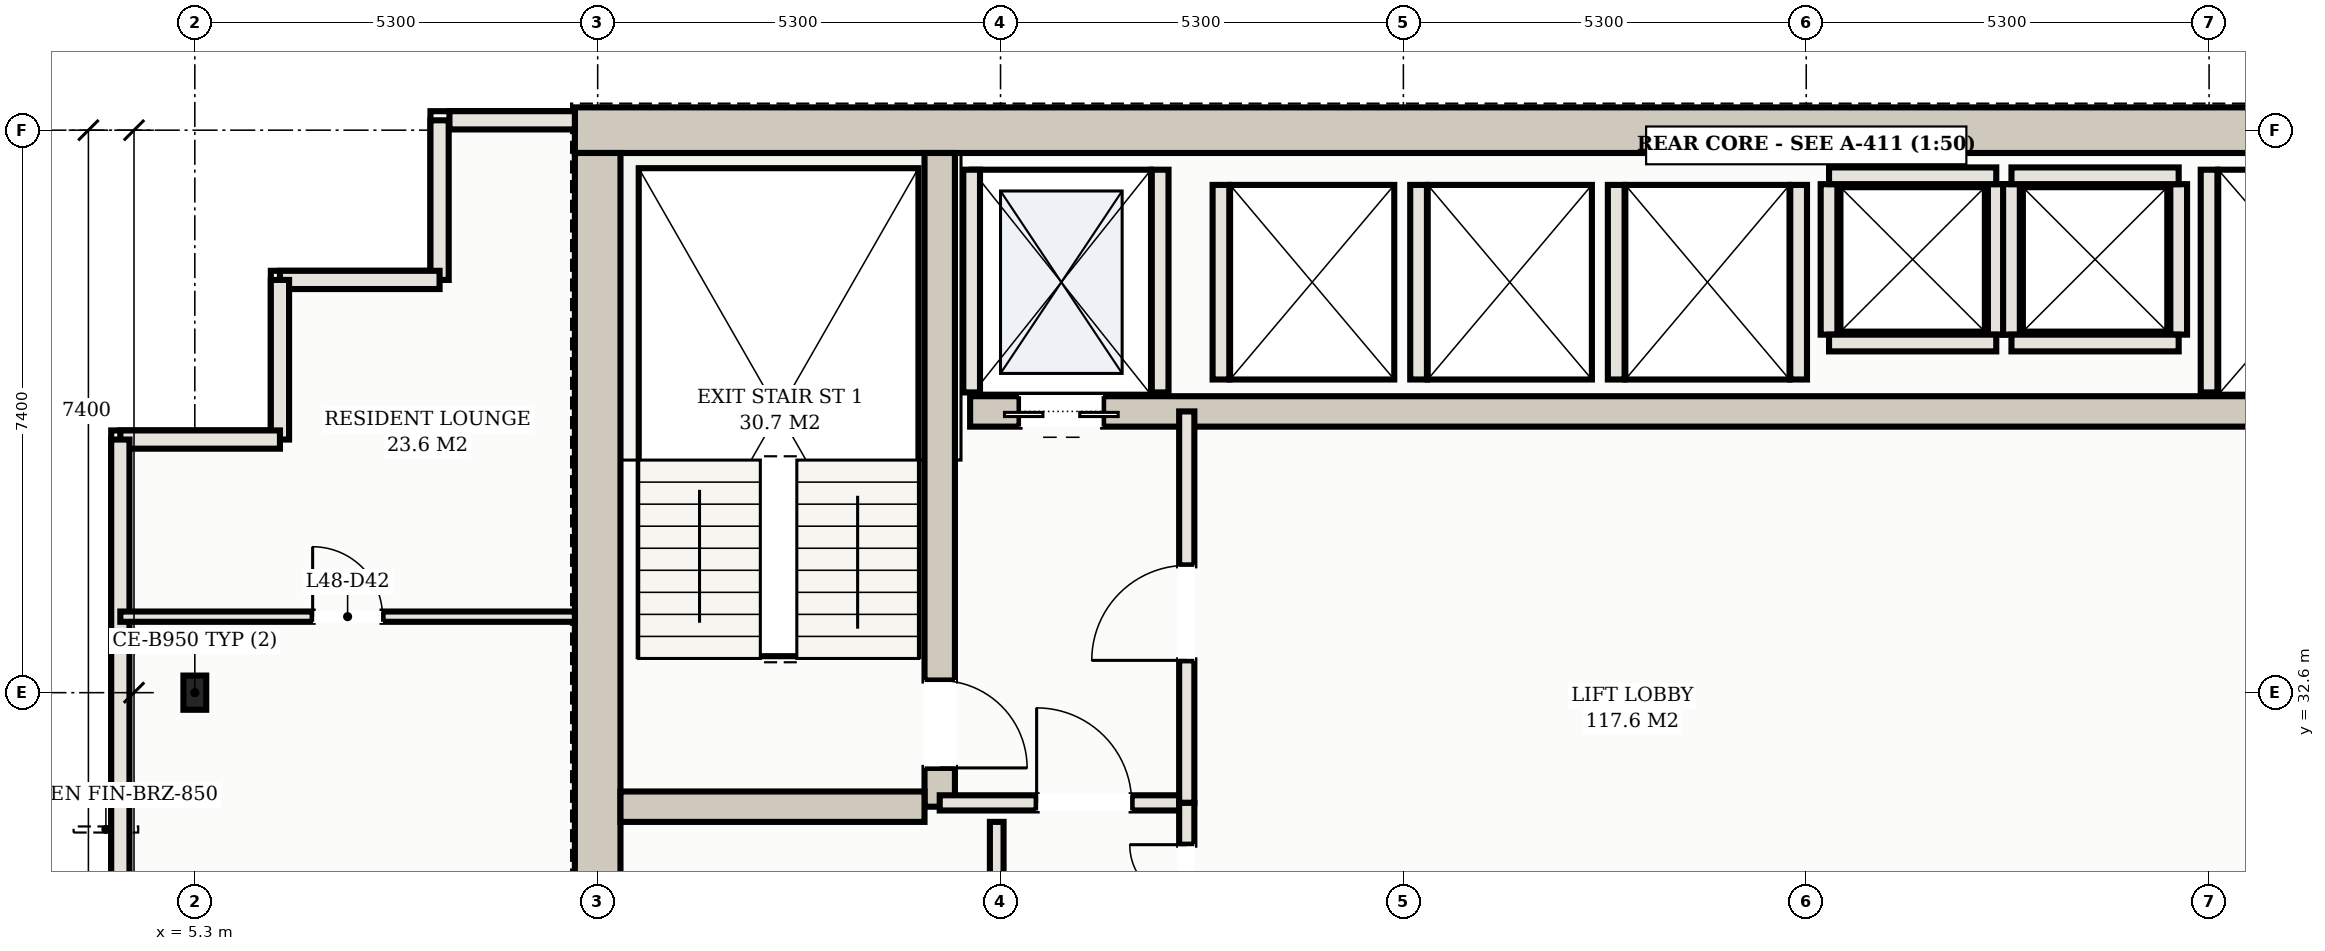
"""IFC4 building model, lengths in metres.
Left out: names, types, materials, properties, quantities, classifications, styles, units other than length and angle.
Written with IfcOpenShell. Run it as: python <this file> out.ifc"""

import sys

from ifc_helpers import new_model, si_unit, direction, frame, frame_2d, origin, origin_2d, place, context, subcontext, project, spatial, rectangle, hollow_rectangle, extrude, element, fill, save


model = new_model("IFC4")
c1 = context("Model", 3, precision=1e-05, world=origin(), true_north=direction((0.0, 1.0)))
c2 = subcontext(c1, "Body", "Model", "MODEL_VIEW")
j1 = project(units=[si_unit("LENGTHUNIT", "METRE"), si_unit("PLANEANGLEUNIT", "RADIAN")], contexts=[c1])
p1 = place(None, origin())
s1 = spatial("IfcSite", under=j1, at=p1, CompositionType="ELEMENT")
p2 = place(p1, origin())
s2 = spatial("IfcBuilding", under=s1, at=p2, CompositionType="ELEMENT")
p3 = place(p2, frame((0.0, 0.0, 175.5)))
s3 = spatial("IfcBuildingStorey", under=s2, at=p3, CompositionType="ELEMENT", Elevation=175.5)
p4 = place(p3, frame((10.3, 40.0, 0.0), z_axis=(0.0, 0.0, 1.0), x_axis=(1.0, 0.0, 0.0)))
e1 = element("IfcWall", 1, at=p4, inside=s3, PredefinedType="SHEAR", context=c2, shape_type="SweptSolid", body=[
    extrude(rectangle(XDim=32.4, YDim=0.6, at=frame_2d((16.2, 0.0))), origin(), (0.0, 0.0, 1.0), 3.1),
])
p5 = place(p3, frame((10.6, 25.5, 0.0), z_axis=(0.0, 0.0, 1.0), x_axis=(0.0, 1.0, 0.0)))
e2 = element("IfcWall", 2, at=p5, inside=s3, PredefinedType="SHEAR", context=c2, shape_type="SweptSolid", body=[
    extrude(rectangle(XDim=14.2, YDim=0.6, at=frame_2d((7.1, 0.0))), origin(), (0.0, 0.0, 1.0), 3.1),
])
p6 = place(p3, frame((15.1, 31.1, 0.0), z_axis=(0.0, 0.0, 1.0), x_axis=(0.0, 1.0, 0.0)))
e3 = element("IfcWall", 3, at=p6, inside=s3, PredefinedType="SHEAR", context=c2, shape_type="SweptSolid", body=[
    extrude(rectangle(XDim=8.6, YDim=0.4, at=frame_2d((4.3, 0.0))), origin(), (0.0, 0.0, 1.0), 3.1),
])
p7 = place(p6, frame((0.51, 0.0, 0.0)))
e4 = element("IfcOpeningElement", 4, at=p7, cuts=e3, PredefinedType="OPENING", context=c2, shape_type="SweptSolid", body=[
    extrude(rectangle(XDim=1.15, YDim=2.2, at=frame_2d((0.575, 1.1))), frame((0.0, 0.21, 0.0), z_axis=(0.0, -1.0, 0.0), x_axis=(1.0, 0.0, 0.0)), (0.0, 0.0, 1.0), 0.42),
])
p8 = place(p3, frame((10.9, 31.1, 0.0), z_axis=(0.0, 0.0, 1.0), x_axis=(1.0, 0.0, 0.0)))
e5 = element("IfcWall", 5, at=p8, inside=s3, PredefinedType="SHEAR", context=c2, shape_type="SweptSolid", body=[
    extrude(rectangle(XDim=4.0, YDim=0.4, at=frame_2d((2.0, 0.0))), origin(), (0.0, 0.0, 1.0), 3.1),
])
p9 = place(p3, frame((15.5, 36.3, 0.0), z_axis=(0.0, 0.0, 1.0), x_axis=(1.0, 0.0, 0.0)))
e6 = element("IfcWall", 6, at=p9, inside=s3, PredefinedType="SHEAR", context=c2, shape_type="SweptSolid", body=[
    extrude(rectangle(XDim=22.0, YDim=0.4, at=frame_2d((11.0, 0.0))), origin(), (0.0, 0.0, 1.0), 3.1),
])
p10 = place(p9, frame((0.65, 0.0, 0.0)))
e7 = element("IfcOpeningElement", 7, at=p10, cuts=e6, PredefinedType="OPENING", context=c2, shape_type="SweptSolid", body=[
    extrude(rectangle(XDim=1.1, YDim=2.15, at=frame_2d((0.55, 1.075))), frame((0.0, 0.21, 0.0), z_axis=(0.0, -1.0, 0.0), x_axis=(1.0, 0.0, 0.0)), (0.0, 0.0, 1.0), 0.42),
])
p11 = place(p9, frame((20.25, 0.0, 0.0)))
e8 = element("IfcOpeningElement", 8, at=p11, cuts=e6, PredefinedType="OPENING", context=c2, shape_type="SweptSolid", body=[
    extrude(rectangle(XDim=1.1, YDim=2.15, at=frame_2d((0.55, 1.075))), frame((0.0, 0.21, 0.0), z_axis=(0.0, -1.0, 0.0), x_axis=(1.0, 0.0, 0.0)), (0.0, 0.0, 1.0), 0.42),
])
p12 = place(p9, frame((17.05, 0.0, 0.0)))
e9 = element("IfcOpeningElement", 9, at=p12, cuts=e6, PredefinedType="OPENING", context=c2, shape_type="SweptSolid", body=[
    extrude(rectangle(XDim=1.3, YDim=2.2, at=frame_2d((0.65, 1.1))), frame((0.0, 0.21, 0.0), z_axis=(0.0, -1.0, 0.0), x_axis=(1.0, 0.0, 0.0)), (0.0, 0.0, 1.0), 0.42),
])
p13 = place(p3, frame((5.3, 32.6, 0.0), z_axis=(0.0, 0.0, 1.0), x_axis=(1.0, 0.0, 0.0)))
e10 = element("IfcColumn", 10, at=p13, inside=s3, PredefinedType="COLUMN", context=c2, shape_type="SweptSolid", body=[
    extrude(hollow_rectangle(XDim=0.3, YDim=0.45, WallThickness=0.016, at=origin_2d()), origin(), (0.0, 0.0, 1.0), 3.3),
])
for number, where, z_axis, x_axis in (
    (11, (15.52, 36.55, 0.0), (0.0, 0.0, 1.0), (0.0, 1.0, 0.0)),
    (12, (18.0, 36.55, 0.0), (0.0, 0.0, 1.0), (0.0, 1.0, 0.0)),
    (13, (31.8, 36.55, 0.0), (0.0, 0.0, 1.0), (0.0, 1.0, 0.0)),
):
    element("IfcWall", number, at=place(p3, frame(where, z_axis=z_axis, x_axis=x_axis)), inside=s3, PredefinedType="SOLIDWALL", context=c2, shape_type="SweptSolid", body=[
        extrude(rectangle(XDim=2.93, YDim=0.22, at=frame_2d((1.465, 0.0))), origin(), (0.0, 0.0, 1.0), 3.1),
    ])
for number, where, z_axis, x_axis in (
    (14, (18.8, 36.72, 0.0), (0.0, 0.0, 1.0), (0.0, 1.0, 0.0)),
    (15, (21.4, 36.72, 0.0), (0.0, 0.0, 1.0), (0.0, 1.0, 0.0)),
    (16, (24.0, 36.72, 0.0), (0.0, 0.0, 1.0), (0.0, 1.0, 0.0)),
    (17, (26.4, 36.72, 0.0), (0.0, 0.0, 1.0), (0.0, 1.0, 0.0)),
):
    element("IfcWall", number, at=place(p3, frame(where, z_axis=z_axis, x_axis=x_axis)), inside=s3, PredefinedType="SOLIDWALL", context=c2, shape_type="SweptSolid", body=[
        extrude(rectangle(XDim=2.56, YDim=0.22, at=frame_2d((1.28, 0.0))), origin(), (0.0, 0.0, 1.0), 3.1),
    ])
for number, where, z_axis, x_axis in (
    (18, (26.8, 37.31, 0.0), (0.0, 0.0, 1.0), (0.0, 1.0, 0.0)),
    (19, (29.0, 37.31, 0.0), (0.0, 0.0, 1.0), (0.0, 1.0, 0.0)),
):
    element("IfcWall", number, at=place(p3, frame(where, z_axis=z_axis, x_axis=x_axis)), inside=s3, PredefinedType="SOLIDWALL", context=c2, shape_type="SweptSolid", body=[
        extrude(rectangle(XDim=1.98, YDim=0.22, at=frame_2d((0.99, 0.0))), origin(), (0.0, 0.0, 1.0), 3.1),
    ])
for number, where, z_axis, x_axis in (
    (20, (26.8, 39.4, 0.0), (0.0, 0.0, 1.0), (1.0, 0.0, 0.0)),
    (21, (26.8, 37.2, 0.0), (0.0, 0.0, 1.0), (1.0, 0.0, 0.0)),
):
    element("IfcWall", number, at=place(p3, frame(where, z_axis=z_axis, x_axis=x_axis)), inside=s3, PredefinedType="SOLIDWALL", context=c2, shape_type="SweptSolid", body=[
        extrude(rectangle(XDim=2.2, YDim=0.22, at=frame_2d((1.1, 0.0))), origin(), (0.0, 0.0, 1.0), 3.1),
    ])
for number, where, z_axis, x_axis in (
    (22, (29.2, 37.31, 0.0), (0.0, 0.0, 1.0), (0.0, 1.0, 0.0)),
    (23, (31.4, 37.31, 0.0), (0.0, 0.0, 1.0), (0.0, 1.0, 0.0)),
):
    element("IfcWall", number, at=place(p3, frame(where, z_axis=z_axis, x_axis=x_axis)), inside=s3, PredefinedType="SOLIDWALL", context=c2, shape_type="SweptSolid", body=[
        extrude(rectangle(XDim=1.98, YDim=0.22, at=frame_2d((0.99, 0.0))), origin(), (0.0, 0.0, 1.0), 3.1),
    ])
for number, where, z_axis, x_axis in (
    (24, (29.2, 39.4, 0.0), (0.0, 0.0, 1.0), (1.0, 0.0, 0.0)),
    (25, (29.2, 37.2, 0.0), (0.0, 0.0, 1.0), (1.0, 0.0, 0.0)),
):
    element("IfcWall", number, at=place(p3, frame(where, z_axis=z_axis, x_axis=x_axis)), inside=s3, PredefinedType="SOLIDWALL", context=c2, shape_type="SweptSolid", body=[
        extrude(rectangle(XDim=2.2, YDim=0.22, at=frame_2d((1.1, 0.0))), origin(), (0.0, 0.0, 1.0), 3.1),
    ])
p14 = place(p3, frame((10.3, 40.13, 0.0), z_axis=(0.0, 0.0, 1.0), x_axis=(-1.0, 0.0, 0.0)))
e26 = element("IfcWall", 26, at=p14, inside=s3, PredefinedType="SOLIDWALL", context=c2, shape_type="SweptSolid", body=[
    extrude(rectangle(XDim=1.65, YDim=0.24, at=frame_2d((0.825, 0.0))), origin(), (0.0, 0.0, 1.0), 3.1),
])
p15 = place(p3, frame((8.52, 40.13, 0.0), z_axis=(0.0, 0.0, 1.0), x_axis=(0.0, -1.0, 0.0)))
e27 = element("IfcWall", 27, at=p15, inside=s3, PredefinedType="SOLIDWALL", context=c2, shape_type="SweptSolid", body=[
    extrude(rectangle(XDim=2.1, YDim=0.24, at=frame_2d((1.05, 0.0))), origin(), (0.0, 0.0, 1.0), 3.1),
])
for number, where, z_axis, x_axis in (
    (28, (8.52, 38.03, 0.0), (0.0, 0.0, 1.0), (-1.0, 0.0, 0.0)),
    (29, (6.42, 38.03, 0.0), (0.0, 0.0, 1.0), (0.0, -1.0, 0.0)),
):
    element("IfcWall", number, at=place(p3, frame(where, z_axis=z_axis, x_axis=x_axis)), inside=s3, PredefinedType="SOLIDWALL", context=c2, shape_type="SweptSolid", body=[
        extrude(rectangle(XDim=2.1, YDim=0.24, at=frame_2d((1.05, 0.0))), origin(), (0.0, 0.0, 1.0), 3.1),
    ])
p16 = place(p3, frame((6.42, 35.93, 0.0), z_axis=(0.0, 0.0, 1.0), x_axis=(-1.0, 0.0, 0.0)))
e30 = element("IfcWall", 30, at=p16, inside=s3, PredefinedType="SOLIDWALL", context=c2, shape_type="SweptSolid", body=[
    extrude(rectangle(XDim=2.1, YDim=0.24, at=frame_2d((1.05, 0.0))), origin(), (0.0, 0.0, 1.0), 3.1),
])
p17 = place(p3, frame((4.32, 35.93, 0.0), z_axis=(0.0, 0.0, 1.0), x_axis=(0.0, -1.0, 0.0)))
e31 = element("IfcWall", 31, at=p17, inside=s3, PredefinedType="SOLIDWALL", context=c2, shape_type="SweptSolid", body=[
    extrude(rectangle(XDim=27.41, YDim=0.24, at=frame_2d((13.705, 0.0))), origin(), (0.0, 0.0, 1.0), 3.1),
])
p18 = place(p17, frame((17.13, 0.0, 0.0)))
e32 = element("IfcOpeningElement", 32, at=p18, cuts=e31, PredefinedType="OPENING", context=c2, shape_type="SweptSolid", body=[
    extrude(rectangle(XDim=1.8, YDim=2.2, at=frame_2d((0.9, 1.1))), frame((0.0, 0.13, 0.0), z_axis=(0.0, -1.0, 0.0), x_axis=(1.0, 0.0, 0.0)), (0.0, 0.0, 1.0), 0.26),
])
p19 = place(p3, frame((15.1, 31.15, 0.0), z_axis=(0.0, 0.0, 1.0), x_axis=(1.0, 0.0, 0.0)))
e33 = element("IfcWall", 33, at=p19, inside=s3, PredefinedType="PARTITIONING", context=c2, shape_type="SweptSolid", body=[
    extrude(rectangle(XDim=3.25, YDim=0.2, at=frame_2d((1.625, 0.0))), origin(), (0.0, 0.0, 1.0), 2.38),
])
p20 = place(p19, frame((1.275, 0.0, 0.0)))
e34 = element("IfcOpeningElement", 34, at=p20, cuts=e33, PredefinedType="OPENING", context=c2, shape_type="SweptSolid", body=[
    extrude(rectangle(XDim=1.25, YDim=2.2, at=frame_2d((0.625, 1.1))), frame((0.0, 0.11, 0.0), z_axis=(0.0, -1.0, 0.0), x_axis=(1.0, 0.0, 0.0)), (0.0, 0.0, 1.0), 0.22),
])
p21 = place(p3, frame((18.35, 31.15, 0.0), z_axis=(0.0, 0.0, 1.0), x_axis=(0.0, 1.0, 0.0)))
e35 = element("IfcWall", 35, at=p21, inside=s3, PredefinedType="PARTITIONING", context=c2, shape_type="SweptSolid", body=[
    extrude(rectangle(XDim=5.15, YDim=0.2, at=frame_2d((2.575, 0.0))), origin(), (0.0, 0.0, 1.0), 2.38),
])
p22 = place(p21, frame((1.875, 0.0, 0.0)))
e36 = element("IfcOpeningElement", 36, at=p22, cuts=e35, PredefinedType="OPENING", context=c2, shape_type="SweptSolid", body=[
    extrude(rectangle(XDim=1.25, YDim=2.2, at=frame_2d((0.625, 1.1))), frame((0.0, 0.11, 0.0), z_axis=(0.0, -1.0, 0.0), x_axis=(1.0, 0.0, 0.0)), (0.0, 0.0, 1.0), 0.22),
])
p23 = place(p3, frame((15.85, 25.5, 0.0), z_axis=(0.0, 0.0, 1.0), x_axis=(0.0, 1.0, 0.0)))
e37 = element("IfcWall", 37, at=p23, inside=s3, PredefinedType="PARTITIONING", context=c2, shape_type="SweptSolid", body=[
    extrude(rectangle(XDim=5.4, YDim=0.18, at=frame_2d((2.7, 0.0))), origin(), (0.0, 0.0, 1.0), 2.38),
])
p24 = place(p23, frame((0.6, 0.0, 0.0)))
e38 = element("IfcOpeningElement", 38, at=p24, cuts=e37, PredefinedType="OPENING", context=c2, shape_type="SweptSolid", body=[
    extrude(rectangle(XDim=0.9, YDim=2.15, at=frame_2d((0.45, 1.075))), frame((0.0, 0.1, 0.0), z_axis=(0.0, -1.0, 0.0), x_axis=(1.0, 0.0, 0.0)), (0.0, 0.0, 1.0), 0.2),
])
p25 = place(p23, frame((3.265, 0.0, 0.0)))
e39 = element("IfcOpeningElement", 39, at=p25, cuts=e37, PredefinedType="OPENING", context=c2, shape_type="SweptSolid", body=[
    extrude(rectangle(XDim=0.92, YDim=2.15, at=frame_2d((0.46, 1.075))), frame((0.0, 0.1, 0.0), z_axis=(0.0, -1.0, 0.0), x_axis=(1.0, 0.0, 0.0)), (0.0, 0.0, 1.0), 0.2),
])
p26 = place(p3, frame((18.35, 28.55, 0.0), z_axis=(0.0, 0.0, 1.0), x_axis=(0.0, 1.0, 0.0)))
e40 = element("IfcWall", 40, at=p26, inside=s3, PredefinedType="PARTITIONING", context=c2, shape_type="SweptSolid", body=[
    extrude(rectangle(XDim=2.6, YDim=0.2, at=frame_2d((1.3, 0.0))), origin(), (0.0, 0.0, 1.0), 2.38),
])
p27 = place(p26, frame((0.55, 0.0, 0.0)))
e41 = element("IfcOpeningElement", 41, at=p27, cuts=e40, PredefinedType="OPENING", context=c2, shape_type="SweptSolid", body=[
    extrude(rectangle(XDim=1.5, YDim=2.25, at=frame_2d((0.75, 1.125))), frame((0.0, 0.11, 0.0), z_axis=(0.0, -1.0, 0.0), x_axis=(1.0, 0.0, 0.0)), (0.0, 0.0, 1.0), 0.22),
])
p28 = place(p3, frame((4.32, 33.6, 0.0), z_axis=(0.0, 0.0, 1.0), x_axis=(1.0, 0.0, 0.0)))
e42 = element("IfcWall", 42, at=p28, inside=s3, PredefinedType="PARTITIONING", context=c2, shape_type="SweptSolid", body=[
    extrude(rectangle(XDim=5.98, YDim=0.135, at=frame_2d((2.99, 0.0))), origin(), (0.0, 0.0, 1.0), 2.38),
])
p29 = place(p28, frame((2.53, 0.0, 0.0)))
e43 = element("IfcOpeningElement", 43, at=p29, cuts=e42, PredefinedType="OPENING", context=c2, shape_type="SweptSolid", body=[
    extrude(rectangle(XDim=0.92, YDim=2.15, at=frame_2d((0.46, 1.075))), frame((0.0, 0.078, 0.0), z_axis=(0.0, -1.0, 0.0), x_axis=(1.0, 0.0, 0.0)), (0.0, 0.0, 1.0), 0.155),
])
p30 = place(p10, frame((1.1, 0.0, 0.0), z_axis=(0.0, 0.0, 1.0), x_axis=(-1.0, 0.0, 0.0)))
e44 = element("IfcDoor", 44, at=p30, inside=s3, OperationType="DOUBLE_DOOR_SLIDING", PredefinedType="DOOR", context=c2, shape_type="SweptSolid", body=[
    extrude(rectangle(XDim=1.1, YDim=2.15, at=frame_2d((0.55, 1.075))), frame((0.0, 0.025, 0.0), z_axis=(0.0, -1.0, 0.0), x_axis=(1.0, 0.0, 0.0)), (0.0, 0.0, 1.0), 0.05),
])
fill(e7, e44)
p31 = place(p20, origin())
e45 = element("IfcDoor", 45, at=p31, inside=s3, OperationType="SINGLE_SWING_LEFT", PredefinedType="DOOR", context=c2, shape_type="SweptSolid", body=[
    extrude(rectangle(XDim=1.25, YDim=2.2, at=frame_2d((0.625, 1.1))), frame((0.0, 0.025, 0.0), z_axis=(0.0, -1.0, 0.0), x_axis=(1.0, 0.0, 0.0)), (0.0, 0.0, 1.0), 0.05),
])
fill(e34, e45)
p32 = place(p22, origin())
e46 = element("IfcDoor", 46, at=p32, inside=s3, OperationType="SINGLE_SWING_LEFT", PredefinedType="DOOR", context=c2, shape_type="SweptSolid", body=[
    extrude(rectangle(XDim=1.25, YDim=2.2, at=frame_2d((0.625, 1.1))), frame((0.0, 0.025, 0.0), z_axis=(0.0, -1.0, 0.0), x_axis=(1.0, 0.0, 0.0)), (0.0, 0.0, 1.0), 0.05),
])
fill(e36, e46)
p33 = place(p7, frame((1.15, 0.0, 0.0), z_axis=(0.0, 0.0, 1.0), x_axis=(-1.0, 0.0, 0.0)))
e47 = element("IfcDoor", 47, at=p33, inside=s3, OperationType="SINGLE_SWING_RIGHT", PredefinedType="DOOR", context=c2, shape_type="SweptSolid", body=[
    extrude(rectangle(XDim=1.15, YDim=2.2, at=frame_2d((0.575, 1.1))), frame((0.0, 0.025, 0.0), z_axis=(0.0, -1.0, 0.0), x_axis=(1.0, 0.0, 0.0)), (0.0, 0.0, 1.0), 0.05),
])
fill(e4, e47)
p34 = place(p27, origin())
e48 = element("IfcDoor", 48, at=p34, inside=s3, OperationType="DOUBLE_DOOR_SINGLE_SWING", PredefinedType="DOOR", context=c2, shape_type="SweptSolid", body=[
    extrude(rectangle(XDim=1.5, YDim=2.25, at=frame_2d((0.75, 1.125))), frame((0.0, 0.025, 0.0), z_axis=(0.0, -1.0, 0.0), x_axis=(1.0, 0.0, 0.0)), (0.0, 0.0, 1.0), 0.05),
])
fill(e41, e48)
p35 = place(p29, origin())
e49 = element("IfcDoor", 49, at=p35, inside=s3, OperationType="SINGLE_SWING_LEFT", PredefinedType="DOOR", context=c2, shape_type="SweptSolid", body=[
    extrude(rectangle(XDim=0.92, YDim=2.15, at=frame_2d((0.46, 1.075))), frame((0.0, 0.025, 0.0), z_axis=(0.0, -1.0, 0.0), x_axis=(1.0, 0.0, 0.0)), (0.0, 0.0, 1.0), 0.05),
])
fill(e43, e49)
save(model, sys.argv[1])
